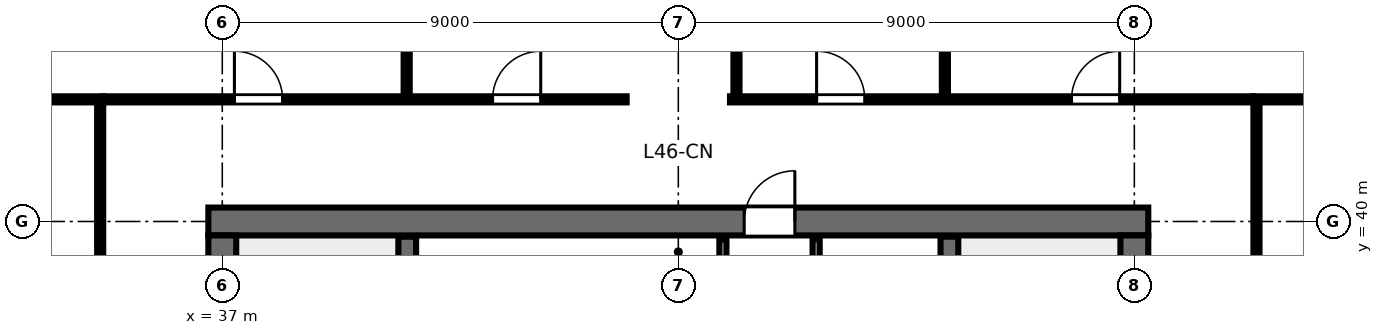
"""IFC4 building model, lengths in metres.
Left out: names, types, materials, properties, quantities, classifications, styles, units other than length and angle.
Written with IfcOpenShell. Run it as: python <this file> out.ifc"""

import sys

from ifc_helpers import new_model, si_unit, direction, frame, frame_2d, origin, place, context, subcontext, project, spatial, rectangle, extrude, element, fill, save


model = new_model("IFC4")
c1 = context("Model", 3, precision=1e-05, world=origin(), true_north=direction((0.0, 1.0)))
c2 = subcontext(c1, "Body", "Model", "MODEL_VIEW")
j1 = project(units=[si_unit("LENGTHUNIT", "METRE"), si_unit("PLANEANGLEUNIT", "RADIAN")], contexts=[c1])
p1 = place(None, origin())
s1 = spatial("IfcSite", under=j1, at=p1, CompositionType="ELEMENT")
p2 = place(p1, origin())
s2 = spatial("IfcBuilding", under=s1, at=p2, CompositionType="ELEMENT")
p3 = place(p2, frame((0.0, 0.0, 177.0)))
s3 = spatial("IfcBuildingStorey", under=s2, at=p3, CompositionType="ELEMENT", Elevation=177.0)
p4 = place(p3, frame((36.725, 40.0, 0.0), z_axis=(0.0, 0.0, 1.0), x_axis=(1.0, 0.0, 0.0)))
e1 = element("IfcWall", 1, at=p4, inside=s3, PredefinedType="SHEAR", context=c2, shape_type="SweptSolid", body=[
    extrude(rectangle(XDim=18.55, YDim=0.55, at=frame_2d((9.275, 0.0))), origin(), (0.0, 0.0, 1.0), 3.36),
])
p5 = place(p4, frame((10.575, 0.0, 0.0)))
e2 = element("IfcOpeningElement", 2, at=p5, cuts=e1, PredefinedType="OPENING", context=c2, shape_type="SweptSolid", body=[
    extrude(rectangle(XDim=1.0, YDim=2.15, at=frame_2d((0.5, 1.075))), frame((0.0, 0.285, 0.0), z_axis=(0.0, -1.0, 0.0), x_axis=(1.0, 0.0, 0.0)), (0.0, 0.0, 1.0), 0.57),
])
p6 = place(p3, frame((37.0, 24.275, 0.0), z_axis=(0.0, 0.0, 1.0), x_axis=(0.0, 1.0, 0.0)))
e3 = element("IfcWall", 3, at=p6, inside=s3, PredefinedType="SHEAR", context=c2, shape_type="SweptSolid", body=[
    extrude(rectangle(XDim=15.45, YDim=0.55, at=frame_2d((7.725, 0.0))), origin(), (0.0, 0.0, 1.0), 3.36),
])
p7 = place(p6, frame((5.25, 0.0, 0.0)))
e4 = element("IfcOpeningElement", 4, at=p7, cuts=e3, PredefinedType="OPENING", context=c2, shape_type="SweptSolid", body=[
    extrude(rectangle(XDim=1.15, YDim=2.15, at=frame_2d((0.575, 1.075))), frame((0.0, 0.285, 0.0), z_axis=(0.0, -1.0, 0.0), x_axis=(1.0, 0.0, 0.0)), (0.0, 0.0, 1.0), 0.57),
])
p8 = place(p3, frame((55.0, 24.275, 0.0), z_axis=(0.0, 0.0, 1.0), x_axis=(0.0, 1.0, 0.0)))
e5 = element("IfcWall", 5, at=p8, inside=s3, PredefinedType="SHEAR", context=c2, shape_type="SweptSolid", body=[
    extrude(rectangle(XDim=15.45, YDim=0.55, at=frame_2d((7.725, 0.0))), origin(), (0.0, 0.0, 1.0), 3.36),
])
p9 = place(p8, frame((5.25, 0.0, 0.0)))
e6 = element("IfcOpeningElement", 6, at=p9, cuts=e5, PredefinedType="OPENING", context=c2, shape_type="SweptSolid", body=[
    extrude(rectangle(XDim=1.15, YDim=2.15, at=frame_2d((0.575, 1.075))), frame((0.0, 0.285, 0.0), z_axis=(0.0, -1.0, 0.0), x_axis=(1.0, 0.0, 0.0)), (0.0, 0.0, 1.0), 0.57),
])
for number, where, z_axis, x_axis in (
    (7, (40.65, 32.0, 0.0), (0.0, 0.0, 1.0), (0.0, 1.0, 0.0)),
    (8, (51.35, 32.0, 0.0), (0.0, 0.0, 1.0), (0.0, 1.0, 0.0)),
):
    element("IfcWall", number, at=place(p3, frame(where, z_axis=z_axis, x_axis=x_axis)), inside=s3, PredefinedType="SHEAR", context=c2, shape_type="SweptSolid", body=[
        extrude(rectangle(XDim=7.7, YDim=0.35, at=frame_2d((3.85, 0.0))), origin(), (0.0, 0.0, 1.0), 3.6),
    ])
p10 = place(p3, frame((46.88, 32.05, 0.0), z_axis=(0.0, 0.0, 1.0), x_axis=(0.0, 1.0, 0.0)))
e9 = element("IfcWall", 9, at=p10, inside=s3, PredefinedType="PARTITIONING", context=c2, shape_type="SweptSolid", body=[
    extrude(rectangle(XDim=7.6, YDim=0.14, at=frame_2d((3.8, 0.0))), origin(), (0.0, 0.0, 1.0), 3.36),
])
p11 = place(p10, frame((3.4, 0.0, 0.0)))
e10 = element("IfcOpeningElement", 10, at=p11, cuts=e9, PredefinedType="OPENING", context=c2, shape_type="SweptSolid", body=[
    extrude(rectangle(XDim=0.95, YDim=2.15, at=frame_2d((0.475, 1.075))), frame((0.0, 0.08, 0.0), z_axis=(0.0, -1.0, 0.0), x_axis=(1.0, 0.0, 0.0)), (0.0, 0.0, 1.0), 0.16),
])
p12 = place(p3, frame((48.72, 32.05, 0.0), z_axis=(0.0, 0.0, 1.0), x_axis=(0.0, 1.0, 0.0)))
e11 = element("IfcWall", 11, at=p12, inside=s3, PredefinedType="PARTITIONING", context=c2, shape_type="SweptSolid", body=[
    extrude(rectangle(XDim=7.6, YDim=0.14, at=frame_2d((3.8, 0.0))), origin(), (0.0, 0.0, 1.0), 3.36),
])
p13 = place(p12, frame((0.8, 0.0, 0.0)))
e12 = element("IfcOpeningElement", 12, at=p13, cuts=e11, PredefinedType="OPENING", context=c2, shape_type="SweptSolid", body=[
    extrude(rectangle(XDim=0.9, YDim=2.15, at=frame_2d((0.45, 1.075))), frame((0.0, 0.08, 0.0), z_axis=(0.0, -1.0, 0.0), x_axis=(1.0, 0.0, 0.0)), (0.0, 0.0, 1.0), 0.16),
])
p14 = place(p12, frame((3.35, 0.0, 0.0)))
e13 = element("IfcOpeningElement", 13, at=p14, cuts=e11, PredefinedType="OPENING", context=c2, shape_type="SweptSolid", body=[
    extrude(rectangle(XDim=0.9, YDim=2.15, at=frame_2d((0.45, 1.075))), frame((0.0, 0.08, 0.0), z_axis=(0.0, -1.0, 0.0), x_axis=(1.0, 0.0, 0.0)), (0.0, 0.0, 1.0), 0.16),
])
p15 = place(p12, frame((5.9, 0.0, 0.0)))
e14 = element("IfcOpeningElement", 14, at=p15, cuts=e11, PredefinedType="OPENING", context=c2, shape_type="SweptSolid", body=[
    extrude(rectangle(XDim=0.92, YDim=2.15, at=frame_2d((0.46, 1.075))), frame((0.0, 0.08, 0.0), z_axis=(0.0, -1.0, 0.0), x_axis=(1.0, 0.0, 0.0)), (0.0, 0.0, 1.0), 0.16),
])
p16 = place(p3, frame((40.639, 42.41, 0.0), z_axis=(0.0, 0.0, 1.0), x_axis=(0.0, 1.0, 0.0)))
e15 = element("IfcWall", 15, at=p16, inside=s3, PredefinedType="PARTITIONING", context=c2, shape_type="SweptSolid", body=[
    extrude(rectangle(XDim=9.33, YDim=0.12, at=frame_2d((4.665, 0.0))), origin(), (0.0, 0.0, 1.0), 2.64),
])
p17 = place(p16, frame((1.4, 0.0, 0.0)))
e16 = element("IfcOpeningElement", 16, at=p17, cuts=e15, PredefinedType="OPENING", context=c2, shape_type="SweptSolid", body=[
    extrude(rectangle(XDim=0.9, YDim=2.15, at=frame_2d((0.45, 1.075))), frame((0.0, 0.07, 0.0), z_axis=(0.0, -1.0, 0.0), x_axis=(1.0, 0.0, 0.0)), (0.0, 0.0, 1.0), 0.14),
])
p18 = place(p3, frame((47.148, 42.41, 0.0), z_axis=(0.0, 0.0, 1.0), x_axis=(0.0, 1.0, 0.0)))
e17 = element("IfcWall", 17, at=p18, inside=s3, PredefinedType="PARTITIONING", context=c2, shape_type="SweptSolid", body=[
    extrude(rectangle(XDim=9.33, YDim=0.12, at=frame_2d((4.665, 0.0))), origin(), (0.0, 0.0, 1.0), 2.64),
])
p19 = place(p18, frame((1.4, 0.0, 0.0)))
e18 = element("IfcOpeningElement", 18, at=p19, cuts=e17, PredefinedType="OPENING", context=c2, shape_type="SweptSolid", body=[
    extrude(rectangle(XDim=0.9, YDim=2.15, at=frame_2d((0.45, 1.075))), frame((0.0, 0.07, 0.0), z_axis=(0.0, -1.0, 0.0), x_axis=(1.0, 0.0, 0.0)), (0.0, 0.0, 1.0), 0.14),
])
p20 = place(p3, frame((51.261, 42.41, 0.0), z_axis=(0.0, 0.0, 1.0), x_axis=(0.0, 1.0, 0.0)))
e19 = element("IfcWall", 19, at=p20, inside=s3, PredefinedType="PARTITIONING", context=c2, shape_type="SweptSolid", body=[
    extrude(rectangle(XDim=9.33, YDim=0.12, at=frame_2d((4.665, 0.0))), origin(), (0.0, 0.0, 1.0), 2.64),
])
p21 = place(p20, frame((1.4, 0.0, 0.0)))
e20 = element("IfcOpeningElement", 20, at=p21, cuts=e19, PredefinedType="OPENING", context=c2, shape_type="SweptSolid", body=[
    extrude(rectangle(XDim=0.9, YDim=2.15, at=frame_2d((0.45, 1.075))), frame((0.0, 0.07, 0.0), z_axis=(0.0, -1.0, 0.0), x_axis=(1.0, 0.0, 0.0)), (0.0, 0.0, 1.0), 0.14),
])
p22 = place(p3, frame((34.65, 42.41, 0.0), z_axis=(0.0, 0.0, 1.0), x_axis=(1.0, 0.0, 0.0)))
e21 = element("IfcWall", 21, at=p22, inside=s3, PredefinedType="PARTITIONING", context=c2, shape_type="SweptSolid", body=[
    extrude(rectangle(XDim=10.33, YDim=0.12, at=frame_2d((5.165, 0.0))), origin(), (0.0, 0.0, 1.0), 2.64),
])
p23 = place(p22, frame((2.59, 0.0, 0.0)))
e22 = element("IfcOpeningElement", 22, at=p23, cuts=e21, PredefinedType="OPENING", context=c2, shape_type="SweptSolid", body=[
    extrude(rectangle(XDim=0.95, YDim=2.15, at=frame_2d((0.475, 1.075))), frame((0.0, 0.07, 0.0), z_axis=(0.0, -1.0, 0.0), x_axis=(1.0, 0.0, 0.0)), (0.0, 0.0, 1.0), 0.14),
])
p24 = place(p22, frame((7.685, 0.0, 0.0)))
e23 = element("IfcOpeningElement", 23, at=p24, cuts=e21, PredefinedType="OPENING", context=c2, shape_type="SweptSolid", body=[
    extrude(rectangle(XDim=0.95, YDim=2.15, at=frame_2d((0.475, 1.075))), frame((0.0, 0.07, 0.0), z_axis=(0.0, -1.0, 0.0), x_axis=(1.0, 0.0, 0.0)), (0.0, 0.0, 1.0), 0.14),
])
p25 = place(p3, frame((47.02, 42.41, 0.0), z_axis=(0.0, 0.0, 1.0), x_axis=(1.0, 0.0, 0.0)))
e24 = element("IfcWall", 24, at=p25, inside=s3, PredefinedType="PARTITIONING", context=c2, shape_type="SweptSolid", body=[
    extrude(rectangle(XDim=10.33, YDim=0.12, at=frame_2d((5.165, 0.0))), origin(), (0.0, 0.0, 1.0), 2.64),
])
p26 = place(p25, frame((1.709, 0.0, 0.0)))
e25 = element("IfcOpeningElement", 25, at=p26, cuts=e24, PredefinedType="OPENING", context=c2, shape_type="SweptSolid", body=[
    extrude(rectangle(XDim=0.95, YDim=2.15, at=frame_2d((0.475, 1.075))), frame((0.0, 0.07, 0.0), z_axis=(0.0, -1.0, 0.0), x_axis=(1.0, 0.0, 0.0)), (0.0, 0.0, 1.0), 0.14),
])
p27 = place(p25, frame((6.74, 0.0, 0.0)))
e26 = element("IfcOpeningElement", 26, at=p27, cuts=e24, PredefinedType="OPENING", context=c2, shape_type="SweptSolid", body=[
    extrude(rectangle(XDim=0.95, YDim=2.15, at=frame_2d((0.475, 1.075))), frame((0.0, 0.07, 0.0), z_axis=(0.0, -1.0, 0.0), x_axis=(1.0, 0.0, 0.0)), (0.0, 0.0, 1.0), 0.14),
])
p28 = place(p3, frame((34.59, 21.65, 0.0), z_axis=(0.0, 0.0, 1.0), x_axis=(0.0, 1.0, 0.0)))
e27 = element("IfcWall", 27, at=p28, inside=s3, PredefinedType="PARTITIONING", context=c2, shape_type="SweptSolid", body=[
    extrude(rectangle(XDim=20.7, YDim=0.12, at=frame_2d((10.35, 0.0))), origin(), (0.0, 0.0, 1.0), 2.64),
])
p29 = place(p28, frame((9.875, 0.0, 0.0)))
e28 = element("IfcOpeningElement", 28, at=p29, cuts=e27, PredefinedType="OPENING", context=c2, shape_type="SweptSolid", body=[
    extrude(rectangle(XDim=0.95, YDim=2.15, at=frame_2d((0.475, 1.075))), frame((0.0, 0.07, 0.0), z_axis=(0.0, -1.0, 0.0), x_axis=(1.0, 0.0, 0.0)), (0.0, 0.0, 1.0), 0.14),
])
p30 = place(p3, frame((57.41, 21.65, 0.0), z_axis=(0.0, 0.0, 1.0), x_axis=(0.0, 1.0, 0.0)))
e29 = element("IfcWall", 29, at=p30, inside=s3, PredefinedType="PARTITIONING", context=c2, shape_type="SweptSolid", body=[
    extrude(rectangle(XDim=20.7, YDim=0.12, at=frame_2d((10.35, 0.0))), origin(), (0.0, 0.0, 1.0), 2.64),
])
p31 = place(p30, frame((6.073, 0.0, 0.0)))
e30 = element("IfcOpeningElement", 30, at=p31, cuts=e29, PredefinedType="OPENING", context=c2, shape_type="SweptSolid", body=[
    extrude(rectangle(XDim=0.95, YDim=2.15, at=frame_2d((0.475, 1.075))), frame((0.0, 0.07, 0.0), z_axis=(0.0, -1.0, 0.0), x_axis=(1.0, 0.0, 0.0)), (0.0, 0.0, 1.0), 0.14),
])
p32 = place(p30, frame((16.223, 0.0, 0.0)))
e31 = element("IfcOpeningElement", 31, at=p32, cuts=e29, PredefinedType="OPENING", context=c2, shape_type="SweptSolid", body=[
    extrude(rectangle(XDim=0.95, YDim=2.15, at=frame_2d((0.475, 1.075))), frame((0.0, 0.07, 0.0), z_axis=(0.0, -1.0, 0.0), x_axis=(1.0, 0.0, 0.0)), (0.0, 0.0, 1.0), 0.14),
])
for number, where, z_axis, x_axis in (
    (32, (34.65, 42.41, 0.0), (0.0, 0.0, 1.0), (-1.0, 0.0, 0.0)),
    (33, (57.35, 42.41, 0.0), (0.0, 0.0, 1.0), (1.0, 0.0, 0.0)),
):
    element("IfcWall", number, at=place(p3, frame(where, z_axis=z_axis, x_axis=x_axis)), inside=s3, PredefinedType="PARTITIONING", context=c2, shape_type="SweptSolid", body=[
        extrude(rectangle(XDim=11.03, YDim=0.12, at=frame_2d((5.515, 0.0))), origin(), (0.0, 0.0, 1.0), 2.64),
    ])
p33 = place(p5, origin())
e34 = element("IfcDoor", 34, at=p33, inside=s3, OperationType="SINGLE_SWING_RIGHT", PredefinedType="DOOR", context=c2, shape_type="SweptSolid", body=[
    extrude(rectangle(XDim=1.0, YDim=2.15, at=frame_2d((0.5, 1.075))), frame((0.0, 0.025, 0.0), z_axis=(0.0, -1.0, 0.0), x_axis=(1.0, 0.0, 0.0)), (0.0, 0.0, 1.0), 0.05),
])
fill(e2, e34)
p34 = place(p23, origin())
e35 = element("IfcDoor", 35, at=p34, inside=s3, OperationType="SINGLE_SWING_LEFT", PredefinedType="DOOR", context=c2, shape_type="SweptSolid", body=[
    extrude(rectangle(XDim=0.95, YDim=2.15, at=frame_2d((0.475, 1.075))), frame((0.0, 0.025, 0.0), z_axis=(0.0, -1.0, 0.0), x_axis=(1.0, 0.0, 0.0)), (0.0, 0.0, 1.0), 0.05),
])
fill(e22, e35)
p35 = place(p24, origin())
e36 = element("IfcDoor", 36, at=p35, inside=s3, OperationType="SINGLE_SWING_RIGHT", PredefinedType="DOOR", context=c2, shape_type="SweptSolid", body=[
    extrude(rectangle(XDim=0.95, YDim=2.15, at=frame_2d((0.475, 1.075))), frame((0.0, 0.025, 0.0), z_axis=(0.0, -1.0, 0.0), x_axis=(1.0, 0.0, 0.0)), (0.0, 0.0, 1.0), 0.05),
])
fill(e23, e36)
p36 = place(p26, origin())
e37 = element("IfcDoor", 37, at=p36, inside=s3, OperationType="SINGLE_SWING_LEFT", PredefinedType="DOOR", context=c2, shape_type="SweptSolid", body=[
    extrude(rectangle(XDim=0.95, YDim=2.15, at=frame_2d((0.475, 1.075))), frame((0.0, 0.025, 0.0), z_axis=(0.0, -1.0, 0.0), x_axis=(1.0, 0.0, 0.0)), (0.0, 0.0, 1.0), 0.05),
])
fill(e25, e37)
p37 = place(p27, origin())
e38 = element("IfcDoor", 38, at=p37, inside=s3, OperationType="SINGLE_SWING_RIGHT", PredefinedType="DOOR", context=c2, shape_type="SweptSolid", body=[
    extrude(rectangle(XDim=0.95, YDim=2.15, at=frame_2d((0.475, 1.075))), frame((0.0, 0.025, 0.0), z_axis=(0.0, -1.0, 0.0), x_axis=(1.0, 0.0, 0.0)), (0.0, 0.0, 1.0), 0.05),
])
fill(e26, e38)
save(model, sys.argv[1])
